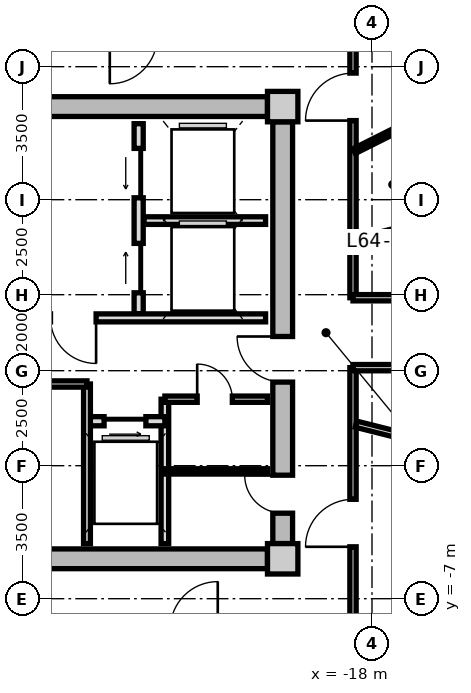
"""IFC4 building model, lengths in metres.
Left out: names, types, materials, properties, quantities, classifications, styles, units other than length and angle.
Written with IfcOpenShell. Run it as: python <this file> out.ifc"""

import sys

from ifc_helpers import new_model, si_unit, direction, frame, frame_2d, origin, origin_2d, place, context, subcontext, project, spatial, rectangle, extrude, source, transform, mapped, element, fill, save


model = new_model("IFC4")
c1 = context("Model", 3, precision=1e-05, world=origin(), true_north=direction((0.0, 1.0)))
c2 = subcontext(c1, "Body", "Model", "MODEL_VIEW")
j1 = project(units=[si_unit("LENGTHUNIT", "METRE"), si_unit("PLANEANGLEUNIT", "RADIAN")], contexts=[c1])
p1 = place(None, origin())
s1 = spatial("IfcSite", under=j1, at=p1, CompositionType="ELEMENT")
p2 = place(p1, origin())
s2 = spatial("IfcBuilding", under=s1, at=p2, CompositionType="ELEMENT")
p3 = place(p2, frame((0.0, 0.0, 207.8)))
s3 = spatial("IfcBuildingStorey", under=s2, at=p3, CompositionType="ELEMENT", Elevation=207.8)
m1 = source(origin(), c2, "Body", "SweptSolid", [
    extrude(rectangle(XDim=0.8, YDim=0.8, at=origin_2d()), origin(), (0.0, 0.0, 1.0), 3.05),
])
for number, where, z_axis, x_axis in (
    (1, (-20.35, -5.95, 0.0), (0.0, 0.0, 1.0), (1.0, 0.0, 0.0)),
    (2, (-20.35, 5.95, 0.0), (0.0, 0.0, 1.0), (1.0, 0.0, 0.0)),
):
    element("IfcColumn", number, at=place(p3, frame(where, z_axis=z_axis, x_axis=x_axis)), inside=s3, PredefinedType="COLUMN", context=c2, shape_type="MappedRepresentation", body=[
        mapped(m1, transform((0.0, 0.0, 0.0), x_axis=(1.0, 0.0, 0.0), y_axis=(0.0, 1.0, 0.0), z_axis=(0.0, 0.0, 1.0), scale=1.0)),
    ])
m2 = source(origin(), c2, "Body", "SweptSolid", [
    extrude(rectangle(XDim=14.5, YDim=0.52, at=frame_2d((7.25, 0.0))), origin(), (0.0, 0.0, 1.0), 2.76),
])
for number, where, z_axis, x_axis in (
    (3, (-35.25, 5.95, 0.0), (0.0, 0.0, 1.0), (1.0, 0.0, 0.0)),
    (4, (-20.75, -5.95, 0.0), (0.0, 0.0, 1.0), (-1.0, 0.0, 0.0)),
):
    element("IfcWall", number, at=place(p3, frame(where, z_axis=z_axis, x_axis=x_axis)), inside=s3, PredefinedType="SHEAR", context=c2, shape_type="MappedRepresentation", body=[
        mapped(m2, transform((0.0, 0.0, 0.0), x_axis=(1.0, 0.0, 0.0), y_axis=(0.0, 1.0, 0.0), z_axis=(0.0, 0.0, 1.0), scale=1.0)),
    ])
m3 = source(origin(), c2, "Body", "SweptSolid", [
    extrude(rectangle(XDim=11.1, YDim=0.52, at=frame_2d((5.55, 0.0))), origin(), (0.0, 0.0, 1.0), 2.76),
])
p4 = place(p3, frame((-20.35, 5.55, 0.0), z_axis=(0.0, 0.0, 1.0), x_axis=(0.0, -1.0, 0.0)))
e5 = element("IfcWall", 5, at=p4, inside=s3, PredefinedType="SHEAR", context=c2, shape_type="MappedRepresentation", body=[
    mapped(m3, transform((0.0, 0.0, 0.0), x_axis=(1.0, 0.0, 0.0), y_axis=(0.0, 1.0, 0.0), z_axis=(0.0, 0.0, 1.0), scale=1.0)),
])
p5 = place(p4, frame((5.65, 0.0, 0.0)))
e6 = element("IfcOpeningElement", 6, at=p5, cuts=e5, PredefinedType="OPENING", context=c2, shape_type="SweptSolid", body=[
    extrude(rectangle(XDim=1.2, YDim=2.15, at=frame_2d((0.6, 1.075))), frame((0.0, 0.27, 0.0), z_axis=(0.0, -1.0, 0.0), x_axis=(1.0, 0.0, 0.0)), (0.0, 0.0, 1.0), 0.54),
])
p6 = place(p4, frame((9.3, 0.0, 0.0)))
e7 = element("IfcOpeningElement", 7, at=p6, cuts=e5, PredefinedType="OPENING", context=c2, shape_type="SweptSolid", body=[
    extrude(rectangle(XDim=1.0, YDim=2.1, at=frame_2d((0.5, 1.05))), frame((0.0, 0.27, 0.0), z_axis=(0.0, -1.0, 0.0), x_axis=(1.0, 0.0, 0.0)), (0.0, 0.0, 1.0), 0.54),
])
m4 = source(origin(), c2, "Body", "SweptSolid", [
    extrude(rectangle(XDim=5.0, YDim=0.24, at=frame_2d((2.5, 0.0))), origin(), (0.0, 0.0, 1.0), 2.745),
])
p7 = place(p3, frame((-24.14, 0.5, 0.0), z_axis=(0.0, 0.0, 1.0), x_axis=(0.0, 1.0, 0.0)))
e8 = element("IfcWall", 8, at=p7, inside=s3, PredefinedType="PARTITIONING", context=c2, shape_type="MappedRepresentation", body=[
    mapped(m4, transform((0.0, 0.0, 0.0), x_axis=(1.0, 0.0, 0.0), y_axis=(0.0, 1.0, 0.0), z_axis=(0.0, 0.0, 1.0), scale=1.0)),
])
p8 = place(p7, frame((3.05, 0.0, 0.0)))
e9 = element("IfcOpeningElement", 9, at=p8, cuts=e8, PredefinedType="OPENING", context=c2, shape_type="SweptSolid", body=[
    extrude(rectangle(XDim=1.3, YDim=2.2, at=frame_2d((0.65, 1.1))), frame((0.0, 0.13, 0.0), z_axis=(0.0, -1.0, 0.0), x_axis=(1.0, 0.0, 0.0)), (0.0, 0.0, 1.0), 0.26),
])
p9 = place(p7, frame((0.55, 0.0, 0.0)))
e10 = element("IfcOpeningElement", 10, at=p9, cuts=e8, PredefinedType="OPENING", context=c2, shape_type="SweptSolid", body=[
    extrude(rectangle(XDim=1.3, YDim=2.2, at=frame_2d((0.65, 1.1))), frame((0.0, 0.13, 0.0), z_axis=(0.0, -1.0, 0.0), x_axis=(1.0, 0.0, 0.0)), (0.0, 0.0, 1.0), 0.26),
])
m5 = source(origin(), c2, "Body", "SweptSolid", [
    extrude(rectangle(XDim=3.2, YDim=0.2, at=frame_2d((1.6, 0.0))), origin(), (0.0, 0.0, 1.0), 2.745),
])
p10 = place(p3, frame((-24.0, 2.95, 0.0), z_axis=(0.0, 0.0, 1.0), x_axis=(1.0, 0.0, 0.0)))
e11 = element("IfcWall", 11, at=p10, inside=s3, PredefinedType="PARTITIONING", context=c2, shape_type="MappedRepresentation", body=[
    mapped(m5, transform((0.0, 0.0, 0.0), x_axis=(1.0, 0.0, 0.0), y_axis=(0.0, 1.0, 0.0), z_axis=(0.0, 0.0, 1.0), scale=1.0)),
])
m6 = source(origin(), c2, "Body", "SweptSolid", [
    extrude(rectangle(XDim=6.66, YDim=0.21, at=frame_2d((3.33, 0.0))), origin(), (0.0, 0.0, 1.0), 2.745),
])
p11 = place(p3, frame((-27.46, 0.39, 0.0), z_axis=(0.0, 0.0, 1.0), x_axis=(1.0, 0.0, 0.0)))
e12 = element("IfcWall", 12, at=p11, inside=s3, PredefinedType="PARTITIONING", context=c2, shape_type="MappedRepresentation", body=[
    mapped(m6, transform((0.0, 0.0, 0.0), x_axis=(1.0, 0.0, 0.0), y_axis=(0.0, 1.0, 0.0), z_axis=(0.0, 0.0, 1.0), scale=1.0)),
])
p12 = place(p11, frame((1.0, 0.0, 0.0)))
e13 = element("IfcOpeningElement", 13, at=p12, cuts=e12, PredefinedType="OPENING", context=c2, shape_type="SweptSolid", body=[
    extrude(rectangle(XDim=1.2, YDim=2.15, at=frame_2d((0.6, 1.075))), frame((0.0, 0.115, 0.0), z_axis=(0.0, -1.0, 0.0), x_axis=(1.0, 0.0, 0.0)), (0.0, 0.0, 1.0), 0.23),
])
m7 = source(origin(), c2, "Body", "SweptSolid", [
    extrude(rectangle(XDim=3.8, YDim=0.2, at=frame_2d((1.9, 0.0))), origin(), (0.0, 0.0, 1.0), 2.745),
])
p13 = place(p3, frame((-23.45, -5.55, 0.0), z_axis=(0.0, 0.0, 1.0), x_axis=(0.0, 1.0, 0.0)))
e14 = element("IfcWall", 14, at=p13, inside=s3, PredefinedType="PARTITIONING", context=c2, shape_type="MappedRepresentation", body=[
    mapped(m7, transform((0.0, 0.0, 0.0), x_axis=(1.0, 0.0, 0.0), y_axis=(0.0, 1.0, 0.0), z_axis=(0.0, 0.0, 1.0), scale=1.0)),
])
m8 = source(origin(), c2, "Body", "SweptSolid", [
    extrude(rectangle(XDim=2.05, YDim=0.24, at=frame_2d((1.025, 0.0))), origin(), (0.0, 0.0, 1.0), 2.745),
])
p14 = place(p3, frame((-25.5, -2.33, 0.0), z_axis=(0.0, 0.0, 1.0), x_axis=(1.0, 0.0, 0.0)))
e15 = element("IfcWall", 15, at=p14, inside=s3, PredefinedType="PARTITIONING", context=c2, shape_type="MappedRepresentation", body=[
    mapped(m8, transform((0.0, 0.0, 0.0), x_axis=(1.0, 0.0, 0.0), y_axis=(0.0, 1.0, 0.0), z_axis=(0.0, 0.0, 1.0), scale=1.0)),
])
p15 = place(p14, frame((0.45, 0.0, 0.0)))
e16 = element("IfcOpeningElement", 16, at=p15, cuts=e15, PredefinedType="OPENING", context=c2, shape_type="SweptSolid", body=[
    extrude(rectangle(XDim=1.1, YDim=2.2, at=frame_2d((0.55, 1.1))), frame((0.0, 0.13, 0.0), z_axis=(0.0, -1.0, 0.0), x_axis=(1.0, 0.0, 0.0)), (0.0, 0.0, 1.0), 0.26),
])
m9 = source(origin(), c2, "Body", "SweptSolid", [
    extrude(rectangle(XDim=4.2, YDim=0.18, at=frame_2d((2.1, 0.0))), origin(), (0.0, 0.0, 1.0), 2.745),
])
p16 = place(p3, frame((-25.5, -5.55, 0.0), z_axis=(0.0, 0.0, 1.0), x_axis=(0.0, 1.0, 0.0)))
e17 = element("IfcWall", 17, at=p16, inside=s3, PredefinedType="PARTITIONING", context=c2, shape_type="MappedRepresentation", body=[
    mapped(m9, transform((0.0, 0.0, 0.0), x_axis=(1.0, 0.0, 0.0), y_axis=(0.0, 1.0, 0.0), z_axis=(0.0, 0.0, 1.0), scale=1.0)),
])
m10 = source(origin(), c2, "Body", "SweptSolid", [
    extrude(rectangle(XDim=4.77, YDim=0.165, at=frame_2d((2.385, 0.0))), origin(), (0.0, 0.0, 1.0), 2.745),
])
p17 = place(p3, frame((-30.27, -1.35, 0.0), z_axis=(0.0, 0.0, 1.0), x_axis=(1.0, 0.0, 0.0)))
e18 = element("IfcWall", 18, at=p17, inside=s3, PredefinedType="PARTITIONING", context=c2, shape_type="MappedRepresentation", body=[
    mapped(m10, transform((0.0, 0.0, 0.0), x_axis=(1.0, 0.0, 0.0), y_axis=(0.0, 1.0, 0.0), z_axis=(0.0, 0.0, 1.0), scale=1.0)),
])
p18 = place(p17, frame((1.85, 0.0, 0.0)))
e19 = element("IfcOpeningElement", 19, at=p18, cuts=e18, PredefinedType="OPENING", context=c2, shape_type="SweptSolid", body=[
    extrude(rectangle(XDim=1.0, YDim=2.1, at=frame_2d((0.5, 1.05))), frame((0.0, 0.093, 0.0), z_axis=(0.0, -1.0, 0.0), x_axis=(1.0, 0.0, 0.0)), (0.0, 0.0, 1.0), 0.185),
])
m11 = source(origin(), c2, "Body", "SweptSolid", [
    extrude(rectangle(XDim=2.7, YDim=0.165, at=frame_2d((1.35, 0.0))), origin(), (0.0, 0.0, 1.0), 2.745),
])
p19 = place(p3, frame((-23.45, -1.75, 0.0), z_axis=(0.0, 0.0, 1.0), x_axis=(1.0, 0.0, 0.0)))
e20 = element("IfcWall", 20, at=p19, inside=s3, PredefinedType="PARTITIONING", context=c2, shape_type="MappedRepresentation", body=[
    mapped(m11, transform((0.0, 0.0, 0.0), x_axis=(1.0, 0.0, 0.0), y_axis=(0.0, 1.0, 0.0), z_axis=(0.0, 0.0, 1.0), scale=1.0)),
])
p20 = place(p19, frame((0.85, 0.0, 0.0)))
e21 = element("IfcOpeningElement", 21, at=p20, cuts=e20, PredefinedType="OPENING", context=c2, shape_type="SweptSolid", body=[
    extrude(rectangle(XDim=0.925, YDim=2.1, at=frame_2d((0.462, 1.05))), frame((0.0, 0.093, 0.0), z_axis=(0.0, -1.0, 0.0), x_axis=(1.0, 0.0, 0.0)), (0.0, 0.0, 1.0), 0.185),
])
m12 = source(origin(), c2, "Body", "SweptSolid", [
    extrude(rectangle(XDim=2.7, YDim=0.14, at=frame_2d((1.35, 0.0))), origin(), (0.0, 0.0, 1.0), 2.745),
])
p21 = place(p3, frame((-23.45, -3.65, 0.0), z_axis=(0.0, 0.0, 1.0), x_axis=(1.0, 0.0, 0.0)))
e22 = element("IfcWall", 22, at=p21, inside=s3, PredefinedType="PARTITIONING", context=c2, shape_type="MappedRepresentation", body=[
    mapped(m12, transform((0.0, 0.0, 0.0), x_axis=(1.0, 0.0, 0.0), y_axis=(0.0, 1.0, 0.0), z_axis=(0.0, 0.0, 1.0), scale=1.0)),
])
m13 = source(origin(), c2, "Body", "SweptSolid", [
    extrude(rectangle(XDim=6.88, YDim=0.165, at=frame_2d((3.44, 0.0))), origin(), (0.0, 0.0, 1.0), 2.745),
])
p22 = place(p3, frame((-18.5, 7.8, 0.0), z_axis=(0.0, 0.0, 1.0), x_axis=(0.0, -1.0, 0.0)))
e23 = element("IfcWall", 23, at=p22, inside=s3, PredefinedType="PARTITIONING", context=c2, shape_type="MappedRepresentation", body=[
    mapped(m13, transform((0.0, 0.0, 0.0), x_axis=(1.0, 0.0, 0.0), y_axis=(0.0, 1.0, 0.0), z_axis=(0.0, 0.0, 1.0), scale=1.0)),
])
p23 = place(p22, frame((0.968, 0.0, 0.0)))
e24 = element("IfcOpeningElement", 24, at=p23, cuts=e23, PredefinedType="OPENING", context=c2, shape_type="SweptSolid", body=[
    extrude(rectangle(XDim=1.25, YDim=2.2, at=frame_2d((0.625, 1.1))), frame((0.0, 0.093, 0.0), z_axis=(0.0, -1.0, 0.0), x_axis=(1.0, 0.0, 0.0)), (0.0, 0.0, 1.0), 0.185),
])
p24 = place(p3, frame((-18.5, -0.92, 0.0), z_axis=(0.0, 0.0, 1.0), x_axis=(0.0, -1.0, 0.0)))
e25 = element("IfcWall", 25, at=p24, inside=s3, PredefinedType="PARTITIONING", context=c2, shape_type="MappedRepresentation", body=[
    mapped(m13, transform((0.0, 0.0, 0.0), x_axis=(1.0, 0.0, 0.0), y_axis=(0.0, 1.0, 0.0), z_axis=(0.0, 0.0, 1.0), scale=1.0)),
])
p25 = place(p24, frame((3.464, 0.0, 0.0)))
e26 = element("IfcOpeningElement", 26, at=p25, cuts=e25, PredefinedType="OPENING", context=c2, shape_type="SweptSolid", body=[
    extrude(rectangle(XDim=1.25, YDim=2.2, at=frame_2d((0.625, 1.1))), frame((0.0, 0.093, 0.0), z_axis=(0.0, -1.0, 0.0), x_axis=(1.0, 0.0, 0.0)), (0.0, 0.0, 1.0), 0.185),
])
m14 = source(origin(), c2, "Body", "SweptSolid", [
    extrude(rectangle(XDim=6.157, YDim=0.165, at=frame_2d((3.079, 0.0))), origin(), (0.0, 0.0, 1.0), 2.345),
])
for number, where, z_axis, x_axis in (
    (27, (-18.42, -2.407, 0.0), (0.0, 0.0, 1.0), (0.97, -0.244, 0.0)),
    (28, (-18.42, 2.407, 0.0), (0.0, 0.0, 1.0), (0.97, 0.244, 0.0)),
):
    element("IfcWall", number, at=place(p3, frame(where, z_axis=z_axis, x_axis=x_axis)), inside=s3, PredefinedType="PARTITIONING", context=c2, shape_type="MappedRepresentation", body=[
        mapped(m14, transform((0.0, 0.0, 0.0), x_axis=(1.0, 0.0, 0.0), y_axis=(0.0, 1.0, 0.0), z_axis=(0.0, 0.0, 1.0), scale=1.0)),
    ])
m15 = source(origin(), c2, "Body", "SweptSolid", [
    extrude(rectangle(XDim=2.06, YDim=0.14, at=frame_2d((1.03, 0.0))), origin(), (0.0, 0.0, 1.0), 2.745),
])
p26 = place(p3, frame((-18.47, 4.778, 0.0), z_axis=(0.0, 0.0, 1.0), x_axis=(0.893952568722, 0.448161583444, 0.0)))
e29 = element("IfcWall", 29, at=p26, inside=s3, PredefinedType="PARTITIONING", context=c2, shape_type="MappedRepresentation", body=[
    mapped(m15, transform((0.0, 0.0, 0.0), x_axis=(1.0, 0.0, 0.0), y_axis=(0.0, 1.0, 0.0), z_axis=(0.0, 0.0, 1.0), scale=1.0)),
])
m16 = source(origin(), c2, "Body", "SweptSolid", [
    extrude(rectangle(XDim=37.0, YDim=0.165, at=frame_2d((18.5, 0.0))), origin(), (0.0, 0.0, 1.0), 2.745),
])
p27 = place(p3, frame((-18.5, -0.92, 0.0), z_axis=(0.0, 0.0, 1.0), x_axis=(1.0, 0.0, 0.0)))
e30 = element("IfcWall", 30, at=p27, inside=s3, PredefinedType="PARTITIONING", context=c2, shape_type="MappedRepresentation", body=[
    mapped(m16, transform((0.0, 0.0, 0.0), x_axis=(1.0, 0.0, 0.0), y_axis=(0.0, 1.0, 0.0), z_axis=(0.0, 0.0, 1.0), scale=1.0)),
])
p28 = place(p27, frame((2.662, 0.0, 0.0)))
e31 = element("IfcOpeningElement", 31, at=p28, cuts=e30, PredefinedType="OPENING", context=c2, shape_type="SweptSolid", body=[
    extrude(rectangle(XDim=0.95, YDim=2.1, at=frame_2d((0.475, 1.05))), frame((0.0, 0.093, 0.0), z_axis=(0.0, -1.0, 0.0), x_axis=(1.0, 0.0, 0.0)), (0.0, 0.0, 1.0), 0.185),
])
p29 = place(p27, frame((33.388, 0.0, 0.0)))
e32 = element("IfcOpeningElement", 32, at=p29, cuts=e30, PredefinedType="OPENING", context=c2, shape_type="SweptSolid", body=[
    extrude(rectangle(XDim=0.95, YDim=2.1, at=frame_2d((0.475, 1.05))), frame((0.0, 0.093, 0.0), z_axis=(0.0, -1.0, 0.0), x_axis=(1.0, 0.0, 0.0)), (0.0, 0.0, 1.0), 0.185),
])
p30 = place(p27, frame((9.075, 0.0, 0.0)))
e33 = element("IfcOpeningElement", 33, at=p30, cuts=e30, PredefinedType="OPENING", context=c2, shape_type="SweptSolid", body=[
    extrude(rectangle(XDim=1.25, YDim=2.2, at=frame_2d((0.625, 1.1))), frame((0.0, 0.093, 0.0), z_axis=(0.0, -1.0, 0.0), x_axis=(1.0, 0.0, 0.0)), (0.0, 0.0, 1.0), 0.185),
])
p31 = place(p27, frame((14.875, 0.0, 0.0)))
e34 = element("IfcOpeningElement", 34, at=p31, cuts=e30, PredefinedType="OPENING", context=c2, shape_type="SweptSolid", body=[
    extrude(rectangle(XDim=1.25, YDim=2.2, at=frame_2d((0.625, 1.1))), frame((0.0, 0.093, 0.0), z_axis=(0.0, -1.0, 0.0), x_axis=(1.0, 0.0, 0.0)), (0.0, 0.0, 1.0), 0.185),
])
p32 = place(p27, frame((20.875, 0.0, 0.0)))
e35 = element("IfcOpeningElement", 35, at=p32, cuts=e30, PredefinedType="OPENING", context=c2, shape_type="SweptSolid", body=[
    extrude(rectangle(XDim=1.25, YDim=2.2, at=frame_2d((0.625, 1.1))), frame((0.0, 0.093, 0.0), z_axis=(0.0, -1.0, 0.0), x_axis=(1.0, 0.0, 0.0)), (0.0, 0.0, 1.0), 0.185),
])
p33 = place(p27, frame((26.675, 0.0, 0.0)))
e36 = element("IfcOpeningElement", 36, at=p33, cuts=e30, PredefinedType="OPENING", context=c2, shape_type="SweptSolid", body=[
    extrude(rectangle(XDim=1.25, YDim=2.2, at=frame_2d((0.625, 1.1))), frame((0.0, 0.093, 0.0), z_axis=(0.0, -1.0, 0.0), x_axis=(1.0, 0.0, 0.0)), (0.0, 0.0, 1.0), 0.185),
])
p34 = place(p3, frame((-18.5, 0.92, 0.0), z_axis=(0.0, 0.0, 1.0), x_axis=(1.0, 0.0, 0.0)))
e37 = element("IfcWall", 37, at=p34, inside=s3, PredefinedType="PARTITIONING", context=c2, shape_type="MappedRepresentation", body=[
    mapped(m16, transform((0.0, 0.0, 0.0), x_axis=(1.0, 0.0, 0.0), y_axis=(0.0, 1.0, 0.0), z_axis=(0.0, 0.0, 1.0), scale=1.0)),
])
p35 = place(p34, frame((2.662, 0.0, 0.0)))
e38 = element("IfcOpeningElement", 38, at=p35, cuts=e37, PredefinedType="OPENING", context=c2, shape_type="SweptSolid", body=[
    extrude(rectangle(XDim=0.95, YDim=2.1, at=frame_2d((0.475, 1.05))), frame((0.0, 0.093, 0.0), z_axis=(0.0, -1.0, 0.0), x_axis=(1.0, 0.0, 0.0)), (0.0, 0.0, 1.0), 0.185),
])
p36 = place(p34, frame((33.388, 0.0, 0.0)))
e39 = element("IfcOpeningElement", 39, at=p36, cuts=e37, PredefinedType="OPENING", context=c2, shape_type="SweptSolid", body=[
    extrude(rectangle(XDim=0.95, YDim=2.1, at=frame_2d((0.475, 1.05))), frame((0.0, 0.093, 0.0), z_axis=(0.0, -1.0, 0.0), x_axis=(1.0, 0.0, 0.0)), (0.0, 0.0, 1.0), 0.185),
])
p37 = place(p34, frame((7.64, 0.0, 0.0)))
e40 = element("IfcOpeningElement", 40, at=p37, cuts=e37, PredefinedType="OPENING", context=c2, shape_type="SweptSolid", body=[
    extrude(rectangle(XDim=0.92, YDim=2.1, at=frame_2d((0.46, 1.05))), frame((0.0, 0.093, 0.0), z_axis=(0.0, -1.0, 0.0), x_axis=(1.0, 0.0, 0.0)), (0.0, 0.0, 1.0), 0.185),
])
p38 = place(p34, frame((10.275, 0.0, 0.0)))
e41 = element("IfcOpeningElement", 41, at=p38, cuts=e37, PredefinedType="OPENING", context=c2, shape_type="SweptSolid", body=[
    extrude(rectangle(XDim=1.25, YDim=2.2, at=frame_2d((0.625, 1.1))), frame((0.0, 0.093, 0.0), z_axis=(0.0, -1.0, 0.0), x_axis=(1.0, 0.0, 0.0)), (0.0, 0.0, 1.0), 0.185),
])
p39 = place(p34, frame((14.875, 0.0, 0.0)))
e42 = element("IfcOpeningElement", 42, at=p39, cuts=e37, PredefinedType="OPENING", context=c2, shape_type="SweptSolid", body=[
    extrude(rectangle(XDim=1.25, YDim=2.2, at=frame_2d((0.625, 1.1))), frame((0.0, 0.093, 0.0), z_axis=(0.0, -1.0, 0.0), x_axis=(1.0, 0.0, 0.0)), (0.0, 0.0, 1.0), 0.185),
])
p40 = place(p34, frame((20.875, 0.0, 0.0)))
e43 = element("IfcOpeningElement", 43, at=p40, cuts=e37, PredefinedType="OPENING", context=c2, shape_type="SweptSolid", body=[
    extrude(rectangle(XDim=1.25, YDim=2.2, at=frame_2d((0.625, 1.1))), frame((0.0, 0.093, 0.0), z_axis=(0.0, -1.0, 0.0), x_axis=(1.0, 0.0, 0.0)), (0.0, 0.0, 1.0), 0.185),
])
p41 = place(p34, frame((26.675, 0.0, 0.0)))
e44 = element("IfcOpeningElement", 44, at=p41, cuts=e37, PredefinedType="OPENING", context=c2, shape_type="SweptSolid", body=[
    extrude(rectangle(XDim=1.25, YDim=2.2, at=frame_2d((0.625, 1.1))), frame((0.0, 0.093, 0.0), z_axis=(0.0, -1.0, 0.0), x_axis=(1.0, 0.0, 0.0)), (0.0, 0.0, 1.0), 0.185),
])
m17 = source(origin(), c2, "Body", "SweptSolid", [
    extrude(rectangle(XDim=1.3, YDim=2.2, at=frame_2d((0.65, 1.1))), frame((0.0, 0.025, 0.0), z_axis=(0.0, -1.0, 0.0), x_axis=(1.0, 0.0, 0.0)), (0.0, 0.0, 1.0), 0.05),
])
p42 = place(p8, origin())
e45 = element("IfcDoor", 45, at=p42, inside=s3, OperationType="SLIDING_TO_LEFT", PredefinedType="DOOR", context=c2, shape_type="MappedRepresentation", body=[
    mapped(m17, transform((0.0, 0.0, 0.0), x_axis=(1.0, 0.0, 0.0), y_axis=(0.0, 1.0, 0.0), z_axis=(0.0, 0.0, 1.0), scale=1.0)),
])
fill(e9, e45)
p43 = place(p9, origin())
e46 = element("IfcDoor", 46, at=p43, inside=s3, OperationType="SLIDING_TO_RIGHT", PredefinedType="DOOR", context=c2, shape_type="MappedRepresentation", body=[
    mapped(m17, transform((0.0, 0.0, 0.0), x_axis=(1.0, 0.0, 0.0), y_axis=(0.0, 1.0, 0.0), z_axis=(0.0, 0.0, 1.0), scale=1.0)),
])
fill(e10, e46)
m18 = source(origin(), c2, "Body", "SweptSolid", [
    extrude(rectangle(XDim=1.2, YDim=2.15, at=frame_2d((0.6, 1.075))), frame((0.0, 0.025, 0.0), z_axis=(0.0, -1.0, 0.0), x_axis=(1.0, 0.0, 0.0)), (0.0, 0.0, 1.0), 0.05),
])
p44 = place(p12, frame((1.2, 0.0, 0.0), z_axis=(0.0, 0.0, 1.0), x_axis=(-1.0, 0.0, 0.0)))
e47 = element("IfcDoor", 47, at=p44, inside=s3, OperationType="SINGLE_SWING_LEFT", PredefinedType="DOOR", context=c2, shape_type="MappedRepresentation", body=[
    mapped(m18, transform((0.0, 0.0, 0.0), x_axis=(1.0, 0.0, 0.0), y_axis=(0.0, 1.0, 0.0), z_axis=(0.0, 0.0, 1.0), scale=1.0)),
])
fill(e13, e47)
p45 = place(p5, frame((1.2, 0.0, 0.0), z_axis=(0.0, 0.0, 1.0), x_axis=(-1.0, 0.0, 0.0)))
e48 = element("IfcDoor", 48, at=p45, inside=s3, OperationType="SINGLE_SWING_RIGHT", PredefinedType="DOOR", context=c2, shape_type="MappedRepresentation", body=[
    mapped(m18, transform((0.0, 0.0, 0.0), x_axis=(1.0, 0.0, 0.0), y_axis=(0.0, 1.0, 0.0), z_axis=(0.0, 0.0, 1.0), scale=1.0)),
])
fill(e6, e48)
m19 = source(origin(), c2, "Body", "SweptSolid", [
    extrude(rectangle(XDim=1.1, YDim=2.2, at=frame_2d((0.55, 1.1))), frame((0.0, 0.025, 0.0), z_axis=(0.0, -1.0, 0.0), x_axis=(1.0, 0.0, 0.0)), (0.0, 0.0, 1.0), 0.05),
])
p46 = place(p15, frame((1.1, 0.0, 0.0), z_axis=(0.0, 0.0, 1.0), x_axis=(-1.0, 0.0, 0.0)))
e49 = element("IfcDoor", 49, at=p46, inside=s3, OperationType="SLIDING_TO_RIGHT", PredefinedType="DOOR", context=c2, shape_type="MappedRepresentation", body=[
    mapped(m19, transform((0.0, 0.0, 0.0), x_axis=(1.0, 0.0, 0.0), y_axis=(0.0, 1.0, 0.0), z_axis=(0.0, 0.0, 1.0), scale=1.0)),
])
fill(e16, e49)
m20 = source(origin(), c2, "Body", "SweptSolid", [
    extrude(rectangle(XDim=0.925, YDim=2.1, at=frame_2d((0.462, 1.05))), frame((0.0, 0.025, 0.0), z_axis=(0.0, -1.0, 0.0), x_axis=(1.0, 0.0, 0.0)), (0.0, 0.0, 1.0), 0.05),
])
p47 = place(p20, origin())
e50 = element("IfcDoor", 50, at=p47, inside=s3, OperationType="SINGLE_SWING_LEFT", PredefinedType="DOOR", context=c2, shape_type="MappedRepresentation", body=[
    mapped(m20, transform((0.0, 0.0, 0.0), x_axis=(1.0, 0.0, 0.0), y_axis=(0.0, 1.0, 0.0), z_axis=(0.0, 0.0, 1.0), scale=1.0)),
])
fill(e21, e50)
m21 = source(origin(), c2, "Body", "SweptSolid", [
    extrude(rectangle(XDim=1.0, YDim=2.1, at=frame_2d((0.5, 1.05))), frame((0.0, 0.025, 0.0), z_axis=(0.0, -1.0, 0.0), x_axis=(1.0, 0.0, 0.0)), (0.0, 0.0, 1.0), 0.05),
])
p48 = place(p6, frame((1.0, 0.0, 0.0), z_axis=(0.0, 0.0, 1.0), x_axis=(-1.0, 0.0, 0.0)))
e51 = element("IfcDoor", 51, at=p48, inside=s3, OperationType="SINGLE_SWING_RIGHT", PredefinedType="DOOR", context=c2, shape_type="MappedRepresentation", body=[
    mapped(m21, transform((0.0, 0.0, 0.0), x_axis=(1.0, 0.0, 0.0), y_axis=(0.0, 1.0, 0.0), z_axis=(0.0, 0.0, 1.0), scale=1.0)),
])
fill(e7, e51)
m22 = source(origin(), c2, "Body", "SweptSolid", [
    extrude(rectangle(XDim=1.25, YDim=2.2, at=frame_2d((0.625, 1.1))), frame((0.0, 0.025, 0.0), z_axis=(0.0, -1.0, 0.0), x_axis=(1.0, 0.0, 0.0)), (0.0, 0.0, 1.0), 0.05),
])
p49 = place(p23, frame((1.25, 0.0, 0.0), z_axis=(0.0, 0.0, 1.0), x_axis=(-1.0, 0.0, 0.0)))
e52 = element("IfcDoor", 52, at=p49, inside=s3, OperationType="SINGLE_SWING_LEFT", PredefinedType="DOOR", context=c2, shape_type="MappedRepresentation", body=[
    mapped(m22, transform((0.0, 0.0, 0.0), x_axis=(1.0, 0.0, 0.0), y_axis=(0.0, 1.0, 0.0), z_axis=(0.0, 0.0, 1.0), scale=1.0)),
])
fill(e24, e52)
p50 = place(p25, frame((1.25, 0.0, 0.0), z_axis=(0.0, 0.0, 1.0), x_axis=(-1.0, 0.0, 0.0)))
e53 = element("IfcDoor", 53, at=p50, inside=s3, OperationType="SINGLE_SWING_LEFT", PredefinedType="DOOR", context=c2, shape_type="MappedRepresentation", body=[
    mapped(m22, transform((0.0, 0.0, 0.0), x_axis=(1.0, 0.0, 0.0), y_axis=(0.0, 1.0, 0.0), z_axis=(0.0, 0.0, 1.0), scale=1.0)),
])
fill(e26, e53)
save(model, sys.argv[1])
